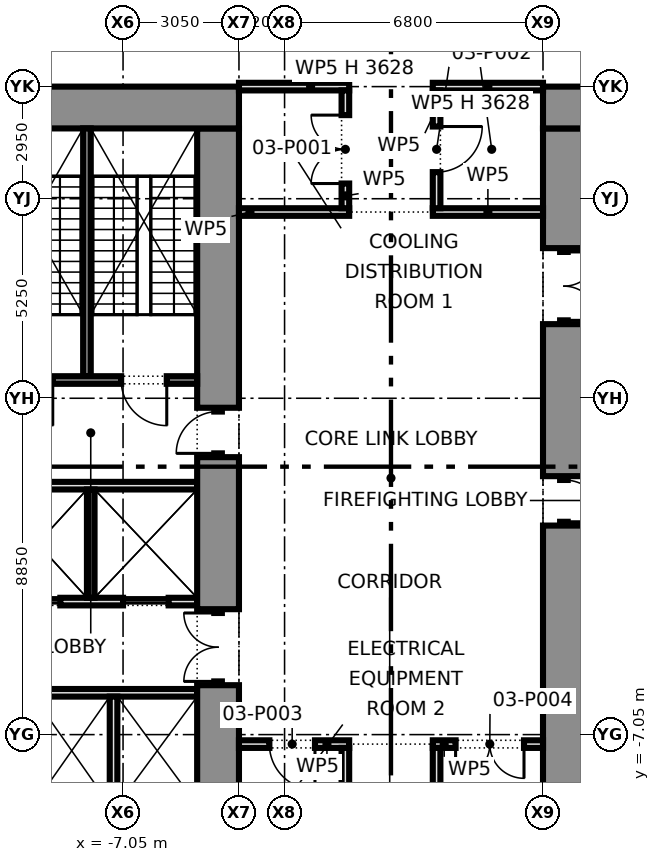
"""IFC4 building model, lengths in metres.
Left out: names, types, materials, properties, quantities, classifications, styles, units other than length and angle.
Written with IfcOpenShell. Run it as: python <this file> out.ifc"""

import sys

from ifc_helpers import new_model, si_unit, direction, frame, frame_2d, origin, place, context, subcontext, project, spatial, rectangle, extrude, element, fill, save


model = new_model("IFC4")
c1 = context("Model", 3, precision=1e-05, world=origin(), true_north=direction((0.0, 1.0)))
c2 = subcontext(c1, "Body", "Model", "MODEL_VIEW")
j1 = project(units=[si_unit("LENGTHUNIT", "METRE"), si_unit("PLANEANGLEUNIT", "RADIAN")], contexts=[c1])
p1 = place(None, origin())
s1 = spatial("IfcSite", under=j1, at=p1, CompositionType="ELEMENT")
p2 = place(p1, origin())
s2 = spatial("IfcBuilding", under=s1, at=p2, CompositionType="ELEMENT")
p3 = place(p2, frame((0.0, 0.0, 11.3)))
s3 = spatial("IfcBuildingStorey", under=s2, at=p3, CompositionType="ELEMENT", Elevation=11.3)
p4 = place(p3, frame((-15.0, 9.45, 0.0), z_axis=(0.0, 0.0, 1.0), x_axis=(1.0, 0.0, 0.0)))
e1 = element("IfcWall", 1, at=p4, inside=s3, PredefinedType="SHEAR", context=c2, shape_type="SweptSolid", body=[
    extrude(rectangle(XDim=11.0, YDim=1.1, at=frame_2d((5.5, 0.0))), origin(), (0.0, 0.0, 1.0), 4.575),
])
p5 = place(p3, frame((-4.55, -8.9, 0.0), z_axis=(0.0, 0.0, 1.0), x_axis=(0.0, 1.0, 0.0)))
e2 = element("IfcWall", 2, at=p5, inside=s3, PredefinedType="SHEAR", context=c2, shape_type="SweptSolid", body=[
    extrude(rectangle(XDim=3.15, YDim=1.1, at=frame_2d((1.575, 0.0))), origin(), (0.0, 0.0, 1.0), 4.575),
])
p6 = place(p3, frame((-4.55, -5.75, 0.0), z_axis=(0.0, 0.0, 1.0), x_axis=(0.0, 1.0, 0.0)))
e3 = element("IfcWall", 3, at=p6, inside=s3, PredefinedType="PARTITIONING", context=c2, shape_type="SweptSolid", body=[
    extrude(rectangle(XDim=2.0, YDim=0.2, at=frame_2d((1.0, 0.0))), origin(), (0.0, 0.0, 1.0), 2.4),
])
p7 = place(p6, frame((0.1, 0.0, 0.0)))
e4 = element("IfcOpeningElement", 4, at=p7, cuts=e3, PredefinedType="OPENING", context=c2, shape_type="SweptSolid", body=[
    extrude(rectangle(XDim=1.8, YDim=2.1, at=frame_2d((0.9, 1.05))), frame((0.0, 0.11, 0.0), z_axis=(0.0, -1.0, 0.0), x_axis=(1.0, 0.0, 0.0)), (0.0, 0.0, 1.0), 0.22),
])
p8 = place(p3, frame((-4.55, -3.75, 0.0), z_axis=(0.0, 0.0, 1.0), x_axis=(0.0, 1.0, 0.0)))
e5 = element("IfcWall", 5, at=p8, inside=s3, PredefinedType="SHEAR", context=c2, shape_type="SweptSolid", body=[
    extrude(rectangle(XDim=4.0, YDim=1.1, at=frame_2d((2.0, 0.0))), origin(), (0.0, 0.0, 1.0), 4.575),
])
p9 = place(p3, frame((-4.55, 0.25, 0.0), z_axis=(0.0, 0.0, 1.0), x_axis=(0.0, 1.0, 0.0)))
e6 = element("IfcWall", 6, at=p9, inside=s3, PredefinedType="PARTITIONING", context=c2, shape_type="SweptSolid", body=[
    extrude(rectangle(XDim=1.3, YDim=0.2, at=frame_2d((0.65, 0.0))), origin(), (0.0, 0.0, 1.0), 2.4),
])
p10 = place(p9, frame((0.1, 0.0, 0.0)))
e7 = element("IfcOpeningElement", 7, at=p10, cuts=e6, PredefinedType="OPENING", context=c2, shape_type="SweptSolid", body=[
    extrude(rectangle(XDim=1.1, YDim=2.1, at=frame_2d((0.55, 1.05))), frame((0.0, 0.11, 0.0), z_axis=(0.0, -1.0, 0.0), x_axis=(1.0, 0.0, 0.0)), (0.0, 0.0, 1.0), 0.22),
])
p11 = place(p3, frame((-4.55, 1.55, 0.0), z_axis=(0.0, 0.0, 1.0), x_axis=(0.0, 1.0, 0.0)))
e8 = element("IfcWall", 8, at=p11, inside=s3, PredefinedType="SHEAR", context=c2, shape_type="SweptSolid", body=[
    extrude(rectangle(XDim=7.35, YDim=1.1, at=frame_2d((3.675, 0.0))), origin(), (0.0, 0.0, 1.0), 4.575),
])
p12 = place(p3, frame((-13.9, -5.95, 0.0), z_axis=(0.0, 0.0, 1.0), x_axis=(1.0, 0.0, 0.0)))
e9 = element("IfcWall", 9, at=p12, inside=s3, PredefinedType="PARTITIONING", context=c2, shape_type="SweptSolid", body=[
    extrude(rectangle(XDim=8.8, YDim=0.2, at=frame_2d((4.4, 0.0))), origin(), (0.0, 0.0, 1.0), 4.575),
])
p13 = place(p12, frame((0.252, 0.0, 0.0)))
e10 = element("IfcOpeningElement", 10, at=p13, cuts=e9, PredefinedType="OPENING", context=c2, shape_type="SweptSolid", body=[
    extrude(rectangle(XDim=0.9, YDim=2.1, at=frame_2d((0.45, 1.05))), frame((0.0, 0.11, 0.0), z_axis=(0.0, -1.0, 0.0), x_axis=(1.0, 0.0, 0.0)), (0.0, 0.0, 1.0), 0.22),
])
p14 = place(p12, frame((2.502, 0.0, 0.0)))
e11 = element("IfcOpeningElement", 11, at=p14, cuts=e9, PredefinedType="OPENING", context=c2, shape_type="SweptSolid", body=[
    extrude(rectangle(XDim=0.9, YDim=2.1, at=frame_2d((0.45, 1.05))), frame((0.0, 0.11, 0.0), z_axis=(0.0, -1.0, 0.0), x_axis=(1.0, 0.0, 0.0)), (0.0, 0.0, 1.0), 0.22),
])
p15 = place(p3, frame((-13.9, -3.55, 0.0), z_axis=(0.0, 0.0, 1.0), x_axis=(1.0, 0.0, 0.0)))
e12 = element("IfcWall", 12, at=p15, inside=s3, PredefinedType="PARTITIONING", context=c2, shape_type="SweptSolid", body=[
    extrude(rectangle(XDim=8.8, YDim=0.2, at=frame_2d((4.4, 0.0))), origin(), (0.0, 0.0, 1.0), 4.575),
])
p16 = place(p15, frame((0.65, 0.0, 0.0)))
e13 = element("IfcOpeningElement", 13, at=p16, cuts=e12, PredefinedType="OPENING", context=c2, shape_type="SweptSolid", body=[
    extrude(rectangle(XDim=1.8, YDim=2.1, at=frame_2d((0.9, 1.05))), frame((0.0, 0.11, 0.0), z_axis=(0.0, -1.0, 0.0), x_axis=(1.0, 0.0, 0.0)), (0.0, 0.0, 1.0), 0.22),
])
p17 = place(p15, frame((4.0, 0.0, 0.0)))
e14 = element("IfcOpeningElement", 14, at=p17, cuts=e12, PredefinedType="OPENING", context=c2, shape_type="SweptSolid", body=[
    extrude(rectangle(XDim=1.2, YDim=2.1, at=frame_2d((0.6, 1.05))), frame((0.0, 0.11, 0.0), z_axis=(0.0, -1.0, 0.0), x_axis=(1.0, 0.0, 0.0)), (0.0, 0.0, 1.0), 0.22),
])
p18 = place(p15, frame((6.85, 0.0, 0.0)))
e15 = element("IfcOpeningElement", 15, at=p18, cuts=e12, PredefinedType="OPENING", context=c2, shape_type="SweptSolid", body=[
    extrude(rectangle(XDim=1.2, YDim=2.1, at=frame_2d((0.6, 1.05))), frame((0.0, 0.11, 0.0), z_axis=(0.0, -1.0, 0.0), x_axis=(1.0, 0.0, 0.0)), (0.0, 0.0, 1.0), 0.22),
])
p19 = place(p3, frame((-13.9, -0.5, 0.0), z_axis=(0.0, 0.0, 1.0), x_axis=(1.0, 0.0, 0.0)))
e16 = element("IfcWall", 16, at=p19, inside=s3, PredefinedType="PARTITIONING", context=c2, shape_type="SweptSolid", body=[
    extrude(rectangle(XDim=8.8, YDim=0.2, at=frame_2d((4.4, 0.0))), origin(), (0.0, 0.0, 1.0), 4.575),
])
p20 = place(p3, frame((-13.9, 2.28, 0.0), z_axis=(0.0, 0.0, 1.0), x_axis=(1.0, 0.0, 0.0)))
e17 = element("IfcWall", 17, at=p20, inside=s3, PredefinedType="SHEAR", context=c2, shape_type="SweptSolid", body=[
    extrude(rectangle(XDim=8.8, YDim=0.2, at=frame_2d((4.4, 0.0))), origin(), (0.0, 0.0, 1.0), 4.575),
])
p21 = place(p20, frame((3.8, 0.0, 0.0)))
e18 = element("IfcOpeningElement", 18, at=p21, cuts=e17, PredefinedType="OPENING", context=c2, shape_type="SweptSolid", body=[
    extrude(rectangle(XDim=1.2, YDim=2.1, at=frame_2d((0.6, 1.05))), frame((0.0, 0.11, 0.0), z_axis=(0.0, -1.0, 0.0), x_axis=(1.0, 0.0, 0.0)), (0.0, 0.0, 1.0), 0.22),
])
p22 = place(p20, frame((6.8, 0.0, 0.0)))
e19 = element("IfcOpeningElement", 19, at=p22, cuts=e17, PredefinedType="OPENING", context=c2, shape_type="SweptSolid", body=[
    extrude(rectangle(XDim=1.2, YDim=2.1, at=frame_2d((0.6, 1.05))), frame((0.0, 0.11, 0.0), z_axis=(0.0, -1.0, 0.0), x_axis=(1.0, 0.0, 0.0)), (0.0, 0.0, 1.0), 0.22),
])
p23 = place(p3, frame((-8.0, 2.38, 0.0), z_axis=(0.0, 0.0, 1.0), x_axis=(0.0, 1.0, 0.0)))
e20 = element("IfcWall", 20, at=p23, inside=s3, PredefinedType="SHEAR", context=c2, shape_type="SweptSolid", body=[
    extrude(rectangle(XDim=6.52, YDim=0.2, at=frame_2d((3.26, 0.0))), origin(), (0.0, 0.0, 1.0), 4.575),
])
for number, where, z_axis, x_axis in (
    (21, (-7.3, -8.9, 0.0), (0.0, 0.0, 1.0), (0.0, 1.0, 0.0)),
    (22, (-7.9, -3.45, 0.0), (0.0, 0.0, 1.0), (0.0, 1.0, 0.0)),
):
    element("IfcWall", number, at=place(p3, frame(where, z_axis=z_axis, x_axis=x_axis)), inside=s3, PredefinedType="PARTITIONING", context=c2, shape_type="SweptSolid", body=[
        extrude(rectangle(XDim=2.85, YDim=0.2, at=frame_2d((1.425, 0.0))), origin(), (0.0, 0.0, 1.0), 4.575),
    ])
p24 = place(p3, frame((15.0, 9.45, 0.0), z_axis=(0.0, 0.0, 1.0), x_axis=(-1.0, 0.0, 0.0)))
e23 = element("IfcWall", 23, at=p24, inside=s3, PredefinedType="SHEAR", context=c2, shape_type="SweptSolid", body=[
    extrude(rectangle(XDim=11.0, YDim=1.1, at=frame_2d((5.5, 0.0))), origin(), (0.0, 0.0, 1.0), 4.575),
])
p25 = place(p3, frame((4.55, 8.9, 0.0), z_axis=(0.0, 0.0, 1.0), x_axis=(0.0, -1.0, 0.0)))
e24 = element("IfcWall", 24, at=p25, inside=s3, PredefinedType="SHEAR", context=c2, shape_type="SweptSolid", body=[
    extrude(rectangle(XDim=3.15, YDim=1.1, at=frame_2d((1.575, 0.0))), origin(), (0.0, 0.0, 1.0), 4.575),
])
p26 = place(p3, frame((4.55, 5.75, 0.0), z_axis=(0.0, 0.0, 1.0), x_axis=(0.0, -1.0, 0.0)))
e25 = element("IfcWall", 25, at=p26, inside=s3, PredefinedType="PARTITIONING", context=c2, shape_type="SweptSolid", body=[
    extrude(rectangle(XDim=2.0, YDim=0.2, at=frame_2d((1.0, 0.0))), origin(), (0.0, 0.0, 1.0), 2.4),
])
p27 = place(p26, frame((0.1, 0.0, 0.0)))
e26 = element("IfcOpeningElement", 26, at=p27, cuts=e25, PredefinedType="OPENING", context=c2, shape_type="SweptSolid", body=[
    extrude(rectangle(XDim=1.8, YDim=2.1, at=frame_2d((0.9, 1.05))), frame((0.0, 0.11, 0.0), z_axis=(0.0, -1.0, 0.0), x_axis=(1.0, 0.0, 0.0)), (0.0, 0.0, 1.0), 0.22),
])
p28 = place(p3, frame((4.55, 3.75, 0.0), z_axis=(0.0, 0.0, 1.0), x_axis=(0.0, -1.0, 0.0)))
e27 = element("IfcWall", 27, at=p28, inside=s3, PredefinedType="SHEAR", context=c2, shape_type="SweptSolid", body=[
    extrude(rectangle(XDim=4.0, YDim=1.1, at=frame_2d((2.0, 0.0))), origin(), (0.0, 0.0, 1.0), 4.575),
])
p29 = place(p3, frame((4.55, -0.25, 0.0), z_axis=(0.0, 0.0, 1.0), x_axis=(0.0, -1.0, 0.0)))
e28 = element("IfcWall", 28, at=p29, inside=s3, PredefinedType="PARTITIONING", context=c2, shape_type="SweptSolid", body=[
    extrude(rectangle(XDim=1.3, YDim=0.2, at=frame_2d((0.65, 0.0))), origin(), (0.0, 0.0, 1.0), 2.4),
])
p30 = place(p29, frame((0.1, 0.0, 0.0)))
e29 = element("IfcOpeningElement", 29, at=p30, cuts=e28, PredefinedType="OPENING", context=c2, shape_type="SweptSolid", body=[
    extrude(rectangle(XDim=1.1, YDim=2.1, at=frame_2d((0.55, 1.05))), frame((0.0, 0.11, 0.0), z_axis=(0.0, -1.0, 0.0), x_axis=(1.0, 0.0, 0.0)), (0.0, 0.0, 1.0), 0.22),
])
p31 = place(p3, frame((4.55, -1.55, 0.0), z_axis=(0.0, 0.0, 1.0), x_axis=(0.0, -1.0, 0.0)))
e30 = element("IfcWall", 30, at=p31, inside=s3, PredefinedType="SHEAR", context=c2, shape_type="SweptSolid", body=[
    extrude(rectangle(XDim=7.35, YDim=1.1, at=frame_2d((3.675, 0.0))), origin(), (0.0, 0.0, 1.0), 4.575),
])
p32 = place(p3, frame((-4.0, -7.3, 0.0), z_axis=(0.0, 0.0, 1.0), x_axis=(1.0, 0.0, 0.0)))
e31 = element("IfcWall", 31, at=p32, inside=s3, PredefinedType="PARTITIONING", context=c2, shape_type="SweptSolid", body=[
    extrude(rectangle(XDim=2.9, YDim=0.2, at=frame_2d((1.45, 0.0))), origin(), (0.0, 0.0, 1.0), 4.575),
])
p33 = place(p32, frame((0.8, 0.0, 0.0)))
e32 = element("IfcOpeningElement", 32, at=p33, cuts=e31, PredefinedType="OPENING", context=c2, shape_type="SweptSolid", body=[
    extrude(rectangle(XDim=1.2, YDim=2.1, at=frame_2d((0.6, 1.05))), frame((0.0, 0.11, 0.0), z_axis=(0.0, -1.0, 0.0), x_axis=(1.0, 0.0, 0.0)), (0.0, 0.0, 1.0), 0.22),
])
p34 = place(p3, frame((1.1, -7.3, 0.0), z_axis=(0.0, 0.0, 1.0), x_axis=(1.0, 0.0, 0.0)))
e33 = element("IfcWall", 33, at=p34, inside=s3, PredefinedType="PARTITIONING", context=c2, shape_type="SweptSolid", body=[
    extrude(rectangle(XDim=2.9, YDim=0.2, at=frame_2d((1.45, 0.0))), origin(), (0.0, 0.0, 1.0), 4.575),
])
p35 = place(p34, frame((0.6, 0.0, 0.0)))
e34 = element("IfcOpeningElement", 34, at=p35, cuts=e33, PredefinedType="OPENING", context=c2, shape_type="SweptSolid", body=[
    extrude(rectangle(XDim=1.8, YDim=2.1, at=frame_2d((0.9, 1.05))), frame((0.0, 0.11, 0.0), z_axis=(0.0, -1.0, 0.0), x_axis=(1.0, 0.0, 0.0)), (0.0, 0.0, 1.0), 0.22),
])
for number, where, z_axis, x_axis in (
    (35, (-4.0, 6.7, 0.0), (0.0, 0.0, 1.0), (1.0, 0.0, 0.0)),
    (36, (1.1, 6.7, 0.0), (0.0, 0.0, 1.0), (1.0, 0.0, 0.0)),
):
    element("IfcWall", number, at=place(p3, frame(where, z_axis=z_axis, x_axis=x_axis)), inside=s3, PredefinedType="PARTITIONING", context=c2, shape_type="SweptSolid", body=[
        extrude(rectangle(XDim=2.9, YDim=0.2, at=frame_2d((1.45, 0.0))), origin(), (0.0, 0.0, 1.0), 4.575),
    ])
for number, where, z_axis, x_axis in (
    (37, (-4.0, 10.0, 0.0), (0.0, 0.0, 1.0), (1.0, 0.0, 0.0)),
    (38, (1.1, 10.0, 0.0), (0.0, 0.0, 1.0), (1.0, 0.0, 0.0)),
):
    element("IfcWall", number, at=place(p3, frame(where, z_axis=z_axis, x_axis=x_axis)), inside=s3, PredefinedType="PARTITIONING", context=c2, shape_type="SweptSolid", body=[
        extrude(rectangle(XDim=2.9, YDim=0.2, at=frame_2d((1.45, 0.0))), origin(), (0.0, 0.0, 1.0), 3.627),
    ])
p36 = place(p3, frame((1.2, -9.9, 0.0), z_axis=(0.0, 0.0, 1.0), x_axis=(0.0, 1.0, 0.0)))
e39 = element("IfcWall", 39, at=p36, inside=s3, PredefinedType="PARTITIONING", context=c2, shape_type="SweptSolid", body=[
    extrude(rectangle(XDim=2.5, YDim=0.2, at=frame_2d((1.25, 0.0))), origin(), (0.0, 0.0, 1.0), 4.575),
])
p37 = place(p3, frame((1.2, 6.8, 0.0), z_axis=(0.0, 0.0, 1.0), x_axis=(0.0, 1.0, 0.0)))
e40 = element("IfcWall", 40, at=p37, inside=s3, PredefinedType="PARTITIONING", context=c2, shape_type="SweptSolid", body=[
    extrude(rectangle(XDim=3.1, YDim=0.2, at=frame_2d((1.55, 0.0))), origin(), (0.0, 0.0, 1.0), 4.575),
])
p38 = place(p37, frame((0.95, 0.0, 0.0)))
e41 = element("IfcOpeningElement", 41, at=p38, cuts=e40, PredefinedType="OPENING", context=c2, shape_type="SweptSolid", body=[
    extrude(rectangle(XDim=1.2, YDim=2.1, at=frame_2d((0.6, 1.05))), frame((0.0, 0.11, 0.0), z_axis=(0.0, -1.0, 0.0), x_axis=(1.0, 0.0, 0.0)), (0.0, 0.0, 1.0), 0.22),
])
p39 = place(p3, frame((-1.2, -9.9, 0.0), z_axis=(0.0, 0.0, 1.0), x_axis=(0.0, 1.0, 0.0)))
e42 = element("IfcWall", 42, at=p39, inside=s3, PredefinedType="PARTITIONING", context=c2, shape_type="SweptSolid", body=[
    extrude(rectangle(XDim=2.5, YDim=0.2, at=frame_2d((1.25, 0.0))), origin(), (0.0, 0.0, 1.0), 4.575),
])
p40 = place(p3, frame((-1.2, 6.8, 0.0), z_axis=(0.0, 0.0, 1.0), x_axis=(0.0, 1.0, 0.0)))
e43 = element("IfcWall", 43, at=p40, inside=s3, PredefinedType="PARTITIONING", context=c2, shape_type="SweptSolid", body=[
    extrude(rectangle(XDim=3.1, YDim=0.2, at=frame_2d((1.55, 0.0))), origin(), (0.0, 0.0, 1.0), 4.575),
])
p41 = place(p40, frame((0.65, 0.0, 0.0)))
e44 = element("IfcOpeningElement", 44, at=p41, cuts=e43, PredefinedType="OPENING", context=c2, shape_type="SweptSolid", body=[
    extrude(rectangle(XDim=1.8, YDim=2.1, at=frame_2d((0.9, 1.05))), frame((0.0, 0.11, 0.0), z_axis=(0.0, -1.0, 0.0), x_axis=(1.0, 0.0, 0.0)), (0.0, 0.0, 1.0), 0.22),
])
p42 = place(p7, origin())
e45 = element("IfcDoor", 45, at=p42, inside=s3, OperationType="DOUBLE_DOOR_SINGLE_SWING", PredefinedType="DOOR", context=c2, shape_type="SweptSolid", body=[
    extrude(rectangle(XDim=1.8, YDim=2.1, at=frame_2d((0.9, 1.05))), frame((0.0, 0.025, 0.0), z_axis=(0.0, -1.0, 0.0), x_axis=(1.0, 0.0, 0.0)), (0.0, 0.0, 1.0), 0.05),
])
fill(e4, e45)
p43 = place(p10, origin())
e46 = element("IfcDoor", 46, at=p43, inside=s3, OperationType="SINGLE_SWING_LEFT", PredefinedType="DOOR", context=c2, shape_type="SweptSolid", body=[
    extrude(rectangle(XDim=1.1, YDim=2.1, at=frame_2d((0.55, 1.05))), frame((0.0, 0.025, 0.0), z_axis=(0.0, -1.0, 0.0), x_axis=(1.0, 0.0, 0.0)), (0.0, 0.0, 1.0), 0.05),
])
fill(e7, e46)
p44 = place(p17, origin())
e47 = element("IfcDoor", 47, at=p44, inside=s3, OperationType="DOUBLE_DOOR_SLIDING", PredefinedType="DOOR", context=c2, shape_type="SweptSolid", body=[
    extrude(rectangle(XDim=1.2, YDim=2.1, at=frame_2d((0.6, 1.05))), frame((0.0, 0.025, 0.0), z_axis=(0.0, -1.0, 0.0), x_axis=(1.0, 0.0, 0.0)), (0.0, 0.0, 1.0), 0.05),
])
fill(e14, e47)
p45 = place(p18, origin())
e48 = element("IfcDoor", 48, at=p45, inside=s3, OperationType="DOUBLE_DOOR_SLIDING", PredefinedType="DOOR", context=c2, shape_type="SweptSolid", body=[
    extrude(rectangle(XDim=1.2, YDim=2.1, at=frame_2d((0.6, 1.05))), frame((0.0, 0.025, 0.0), z_axis=(0.0, -1.0, 0.0), x_axis=(1.0, 0.0, 0.0)), (0.0, 0.0, 1.0), 0.05),
])
fill(e15, e48)
p46 = place(p22, frame((1.2, 0.0, 0.0), z_axis=(0.0, 0.0, 1.0), x_axis=(-1.0, 0.0, 0.0)))
e49 = element("IfcDoor", 49, at=p46, inside=s3, OperationType="SINGLE_SWING_LEFT", PredefinedType="DOOR", context=c2, shape_type="SweptSolid", body=[
    extrude(rectangle(XDim=1.2, YDim=2.1, at=frame_2d((0.6, 1.05))), frame((0.0, 0.025, 0.0), z_axis=(0.0, -1.0, 0.0), x_axis=(1.0, 0.0, 0.0)), (0.0, 0.0, 1.0), 0.05),
])
fill(e19, e49)
p47 = place(p27, origin())
e50 = element("IfcDoor", 50, at=p47, inside=s3, OperationType="DOUBLE_DOOR_SINGLE_SWING", PredefinedType="DOOR", context=c2, shape_type="SweptSolid", body=[
    extrude(rectangle(XDim=1.8, YDim=2.1, at=frame_2d((0.9, 1.05))), frame((0.0, 0.025, 0.0), z_axis=(0.0, -1.0, 0.0), x_axis=(1.0, 0.0, 0.0)), (0.0, 0.0, 1.0), 0.05),
])
fill(e26, e50)
p48 = place(p30, origin())
e51 = element("IfcDoor", 51, at=p48, inside=s3, OperationType="SINGLE_SWING_RIGHT", PredefinedType="DOOR", context=c2, shape_type="SweptSolid", body=[
    extrude(rectangle(XDim=1.1, YDim=2.1, at=frame_2d((0.55, 1.05))), frame((0.0, 0.025, 0.0), z_axis=(0.0, -1.0, 0.0), x_axis=(1.0, 0.0, 0.0)), (0.0, 0.0, 1.0), 0.05),
])
fill(e29, e51)
p49 = place(p41, origin())
e52 = element("IfcDoor", 52, at=p49, inside=s3, OperationType="DOUBLE_DOOR_SINGLE_SWING", PredefinedType="DOOR", context=c2, shape_type="SweptSolid", body=[
    extrude(rectangle(XDim=1.8, YDim=2.1, at=frame_2d((0.9, 1.05))), frame((0.0, 0.025, 0.0), z_axis=(0.0, -1.0, 0.0), x_axis=(1.0, 0.0, 0.0)), (0.0, 0.0, 1.0), 0.05),
])
fill(e44, e52)
p50 = place(p38, frame((1.2, 0.0, 0.0), z_axis=(0.0, 0.0, 1.0), x_axis=(-1.0, 0.0, 0.0)))
e53 = element("IfcDoor", 53, at=p50, inside=s3, OperationType="SINGLE_SWING_LEFT", PredefinedType="DOOR", context=c2, shape_type="SweptSolid", body=[
    extrude(rectangle(XDim=1.2, YDim=2.1, at=frame_2d((0.6, 1.05))), frame((0.0, 0.025, 0.0), z_axis=(0.0, -1.0, 0.0), x_axis=(1.0, 0.0, 0.0)), (0.0, 0.0, 1.0), 0.05),
])
fill(e41, e53)
p51 = place(p33, frame((1.2, 0.0, 0.0), z_axis=(0.0, 0.0, 1.0), x_axis=(-1.0, 0.0, 0.0)))
e54 = element("IfcDoor", 54, at=p51, inside=s3, OperationType="SINGLE_SWING_LEFT", PredefinedType="DOOR", context=c2, shape_type="SweptSolid", body=[
    extrude(rectangle(XDim=1.2, YDim=2.1, at=frame_2d((0.6, 1.05))), frame((0.0, 0.025, 0.0), z_axis=(0.0, -1.0, 0.0), x_axis=(1.0, 0.0, 0.0)), (0.0, 0.0, 1.0), 0.05),
])
fill(e32, e54)
p52 = place(p35, frame((1.8, 0.0, 0.0), z_axis=(0.0, 0.0, 1.0), x_axis=(-1.0, 0.0, 0.0)))
e55 = element("IfcDoor", 55, at=p52, inside=s3, OperationType="DOUBLE_DOOR_SINGLE_SWING", PredefinedType="DOOR", context=c2, shape_type="SweptSolid", body=[
    extrude(rectangle(XDim=1.8, YDim=2.1, at=frame_2d((0.9, 1.05))), frame((0.0, 0.025, 0.0), z_axis=(0.0, -1.0, 0.0), x_axis=(1.0, 0.0, 0.0)), (0.0, 0.0, 1.0), 0.05),
])
fill(e34, e55)
save(model, sys.argv[1])
